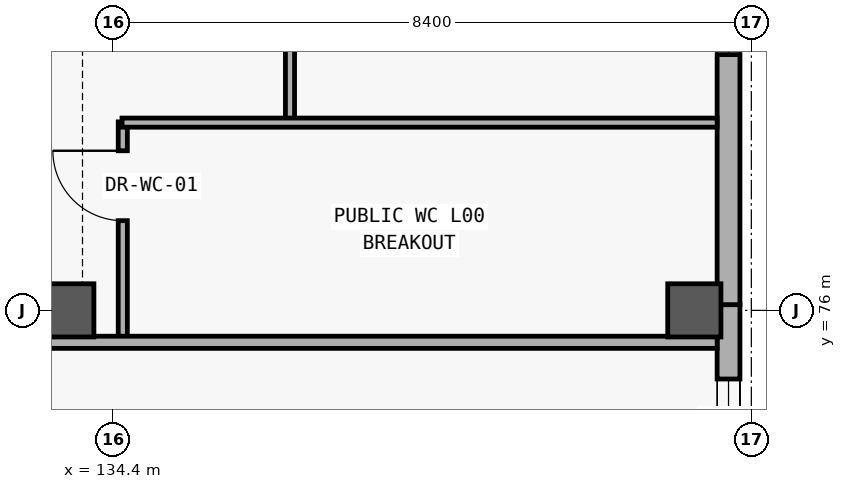
"""IFC4 building model, lengths in metres.
Left out: names, types, materials, properties, quantities, classifications, styles, units other than length and angle.
Written with IfcOpenShell. Run it as: python <this file> out.ifc"""

import sys

from ifc_helpers import new_model, si_unit, direction, frame, frame_2d, origin, origin_2d, place, context, subcontext, project, spatial, rectangle, extrude, element, fill, save


model = new_model("IFC4")
c1 = context("Model", 3, precision=1e-05, world=origin(), true_north=direction((0.0, 1.0)))
c2 = subcontext(c1, "Body", "Model", "MODEL_VIEW")
j1 = project(units=[si_unit("LENGTHUNIT", "METRE"), si_unit("PLANEANGLEUNIT", "RADIAN")], contexts=[c1])
p1 = place(None, origin())
s1 = spatial("IfcSite", under=j1, at=p1, CompositionType="ELEMENT")
p2 = place(p1, origin())
s2 = spatial("IfcBuilding", under=s1, at=p2, CompositionType="ELEMENT")
p3 = place(p2, origin())
s3 = spatial("IfcBuildingStorey", under=s2, at=p3, CompositionType="ELEMENT", Elevation=0.0)
for number, where, z_axis, x_axis in (
    (1, (133.8, 76.0, 0.0), (0.0, 0.0, 1.0), (1.0, 0.0, 0.0)),
    (2, (142.05, 76.0, 0.0), (0.0, 0.0, 1.0), (1.0, 0.0, 0.0)),
):
    element("IfcColumn", number, at=place(p3, frame(where, z_axis=z_axis, x_axis=x_axis)), inside=s3, PredefinedType="COLUMN", context=c2, shape_type="SweptSolid", body=[
        extrude(rectangle(XDim=0.7, YDim=0.7, at=origin_2d()), origin(), (0.0, 0.0, 1.0), 5.4),
    ])
p4 = place(p3, frame((142.5, 76.075, 0.0), z_axis=(0.0, 0.0, 1.0), x_axis=(0.0, -1.0, 0.0)))
e3 = element("IfcWall", 3, at=p4, inside=s3, PredefinedType="SOLIDWALL", context=c2, shape_type="SweptSolid", body=[
    extrude(rectangle(XDim=3.755, YDim=0.3, at=frame_2d((1.877, 0.0))), origin(), (0.0, 0.0, 1.0), 5.1),
])
p5 = place(p4, frame((0.978, 0.0, 0.9)))
e4 = element("IfcOpeningElement", 4, at=p5, cuts=e3, PredefinedType="OPENING", context=c2, shape_type="SweptSolid", body=[
    extrude(rectangle(XDim=1.8, YDim=1.8, at=frame_2d((0.9, 0.9))), frame((0.0, 0.16, 0.0), z_axis=(0.0, -1.0, 0.0), x_axis=(1.0, 0.0, 0.0)), (0.0, 0.0, 1.0), 0.32),
])
p6 = place(p3, frame((142.5, 84.456, 0.0), z_axis=(0.0, 0.0, 1.0), x_axis=(0.0, -1.0, 0.0)))
e5 = element("IfcWall", 5, at=p6, inside=s3, PredefinedType="SOLIDWALL", context=c2, shape_type="SweptSolid", body=[
    extrude(rectangle(XDim=8.381, YDim=0.3, at=frame_2d((4.19, 0.0))), origin(), (0.0, 0.0, 1.0), 5.1),
])
p7 = place(p6, frame((3.291, 0.0, 0.9)))
e6 = element("IfcOpeningElement", 6, at=p7, cuts=e5, PredefinedType="OPENING", context=c2, shape_type="SweptSolid", body=[
    extrude(rectangle(XDim=1.8, YDim=1.8, at=frame_2d((0.9, 0.9))), frame((0.0, 0.16, 0.0), z_axis=(0.0, -1.0, 0.0), x_axis=(1.0, 0.0, 0.0)), (0.0, 0.0, 1.0), 0.32),
])
p8 = place(p3, frame((134.53, 75.62, 0.0), z_axis=(0.0, 0.0, 1.0), x_axis=(0.0, 1.0, 0.0)))
e7 = element("IfcWall", 7, at=p8, inside=s3, PredefinedType="PARTITIONING", context=c2, shape_type="SweptSolid", body=[
    extrude(rectangle(XDim=2.86, YDim=0.12, at=frame_2d((1.43, 0.0))), origin(), (0.0, 0.0, 1.0), 4.18),
])
p9 = place(p8, frame((1.56, 0.0, 0.0)))
e8 = element("IfcOpeningElement", 8, at=p9, cuts=e7, PredefinedType="OPENING", context=c2, shape_type="SweptSolid", body=[
    extrude(rectangle(XDim=0.92, YDim=2.15, at=frame_2d((0.46, 1.075))), frame((0.0, 0.07, 0.0), z_axis=(0.0, -1.0, 0.0), x_axis=(1.0, 0.0, 0.0)), (0.0, 0.0, 1.0), 0.14),
])
p10 = place(p3, frame((136.73, 78.52, 0.0), z_axis=(0.0, 0.0, 1.0), x_axis=(0.0, 1.0, 0.0)))
e9 = element("IfcWall", 9, at=p10, inside=s3, PredefinedType="PARTITIONING", context=c2, shape_type="SweptSolid", body=[
    extrude(rectangle(XDim=5.56, YDim=0.12, at=frame_2d((2.78, 0.0))), origin(), (0.0, 0.0, 1.0), 4.18),
])
p11 = place(p10, frame((1.74, 0.0, 0.0)))
e10 = element("IfcOpeningElement", 10, at=p11, cuts=e9, PredefinedType="OPENING", context=c2, shape_type="SweptSolid", body=[
    extrude(rectangle(XDim=1.04, YDim=2.15, at=frame_2d((0.52, 1.075))), frame((0.0, 0.07, 0.0), z_axis=(0.0, -1.0, 0.0), x_axis=(1.0, 0.0, 0.0)), (0.0, 0.0, 1.0), 0.14),
])
p12 = place(p3, frame((126.32, 75.58, 0.0), z_axis=(0.0, 0.0, 1.0), x_axis=(1.0, 0.0, 0.0)))
e11 = element("IfcWall", 11, at=p12, inside=s3, PredefinedType="PARTITIONING", context=c2, shape_type="SweptSolid", body=[
    extrude(rectangle(XDim=16.03, YDim=0.16, at=frame_2d((8.015, 0.0))), origin(), (0.0, 0.0, 1.0), 4.18),
])
p13 = place(p12, frame((2.809, 0.0, 0.0)))
e12 = element("IfcOpeningElement", 12, at=p13, cuts=e11, PredefinedType="OPENING", context=c2, shape_type="SweptSolid", body=[
    extrude(rectangle(XDim=1.55, YDim=2.25, at=frame_2d((0.775, 1.125))), frame((0.0, 0.09, 0.0), z_axis=(0.0, -1.0, 0.0), x_axis=(1.0, 0.0, 0.0)), (0.0, 0.0, 1.0), 0.18),
])
p14 = place(p3, frame((134.52, 78.47, 0.0), z_axis=(0.0, 0.0, 1.0), x_axis=(1.0, 0.0, 0.0)))
e13 = element("IfcWall", 13, at=p14, inside=s3, PredefinedType="PARTITIONING", context=c2, shape_type="SweptSolid", body=[
    extrude(rectangle(XDim=7.83, YDim=0.12, at=frame_2d((3.915, 0.0))), origin(), (0.0, 0.0, 1.0), 4.18),
])
p15 = place(p5, origin())
e14 = element("IfcWindow", 14, at=p15, inside=s3, PartitioningType="SINGLE_PANEL", PredefinedType="WINDOW", context=c2, shape_type="SweptSolid", body=[
    extrude(rectangle(XDim=1.8, YDim=1.8, at=frame_2d((0.9, 0.9))), frame((0.0, 0.03, 0.0), z_axis=(0.0, -1.0, 0.0), x_axis=(1.0, 0.0, 0.0)), (0.0, 0.0, 1.0), 0.06),
])
fill(e4, e14)
p16 = place(p7, origin())
e15 = element("IfcWindow", 15, at=p16, inside=s3, PartitioningType="SINGLE_PANEL", PredefinedType="WINDOW", context=c2, shape_type="SweptSolid", body=[
    extrude(rectangle(XDim=1.8, YDim=1.8, at=frame_2d((0.9, 0.9))), frame((0.0, 0.03, 0.0), z_axis=(0.0, -1.0, 0.0), x_axis=(1.0, 0.0, 0.0)), (0.0, 0.0, 1.0), 0.06),
])
fill(e6, e15)
p17 = place(p9, origin())
e16 = element("IfcDoor", 16, at=p17, inside=s3, OperationType="SINGLE_SWING_RIGHT", PredefinedType="DOOR", context=c2, shape_type="SweptSolid", body=[
    extrude(rectangle(XDim=0.92, YDim=2.15, at=frame_2d((0.46, 1.075))), frame((0.0, 0.025, 0.0), z_axis=(0.0, -1.0, 0.0), x_axis=(1.0, 0.0, 0.0)), (0.0, 0.0, 1.0), 0.05),
])
fill(e8, e16)
save(model, sys.argv[1])
